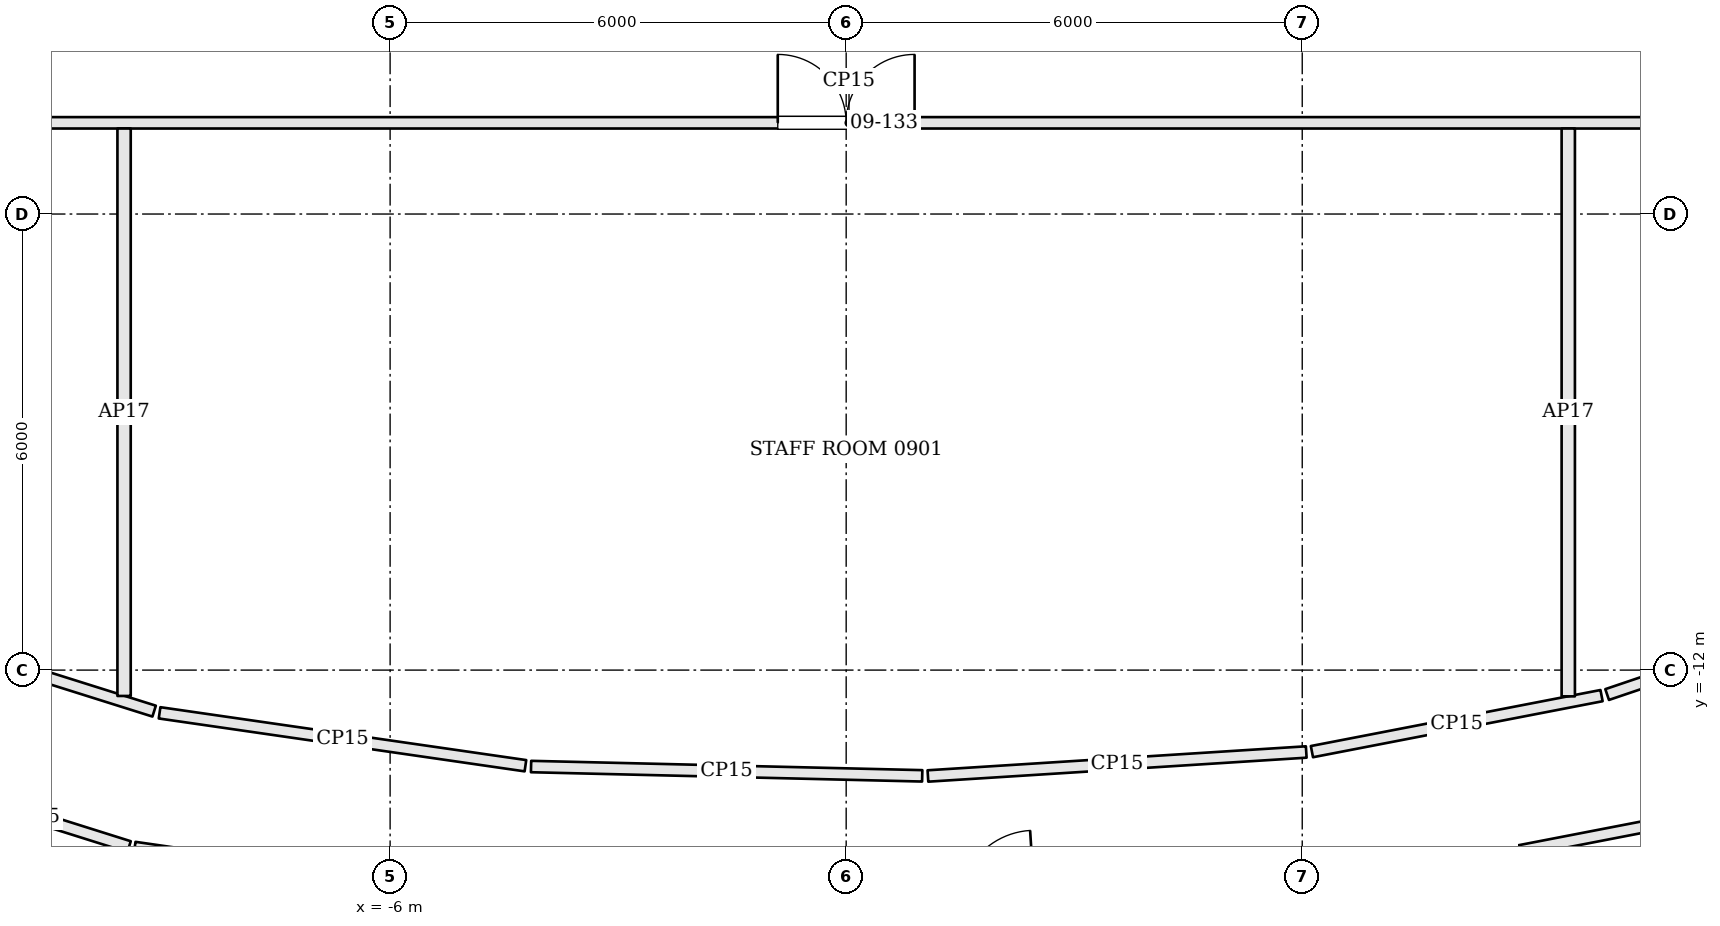
"""IFC4 building model, lengths in metres.
Left out: names, types, materials, properties, quantities, classifications, styles, units other than length and angle.
Written with IfcOpenShell. Run it as: python <this file> out.ifc"""

import sys

from ifc_helpers import new_model, si_unit, direction, frame, frame_2d, origin, place, context, subcontext, project, spatial, rectangle, extrude, element, fill, save


model = new_model("IFC4")
c1 = context("Model", 3, precision=1e-05, world=origin(), true_north=direction((0.0, 1.0)))
c2 = subcontext(c1, "Body", "Model", "MODEL_VIEW")
j1 = project(units=[si_unit("LENGTHUNIT", "METRE"), si_unit("PLANEANGLEUNIT", "RADIAN")], contexts=[c1])
p1 = place(None, origin())
s1 = spatial("IfcSite", under=j1, at=p1, CompositionType="ELEMENT")
p2 = place(p1, origin())
s2 = spatial("IfcBuilding", under=s1, at=p2, CompositionType="ELEMENT")
p3 = place(p2, frame((0.0, 0.0, 48.3)))
s3 = spatial("IfcBuildingStorey", under=s2, at=p3, CompositionType="ELEMENT", Elevation=48.3)
p4 = place(p3, frame((-11.946, -13.533, 0.0), z_axis=(0.0, 0.0, 1.0), x_axis=(0.95388072649, -0.300185875136, 0.0)))
e1 = element("IfcWall", 1, at=p4, inside=s3, PredefinedType="PARTITIONING", context=c2, shape_type="SweptSolid", body=[
    extrude(rectangle(XDim=2.633, YDim=0.15, at=frame_2d((1.316, 0.0))), origin(), (0.0, 0.0, 1.0), 2.68),
])
p5 = place(p3, frame((-9.36, -14.333, 0.0), z_axis=(0.0, 0.0, 1.0), x_axis=(0.989708543436, -0.143097865286, 0.0)))
e2 = element("IfcWall", 2, at=p5, inside=s3, PredefinedType="PARTITIONING", context=c2, shape_type="SweptSolid", body=[
    extrude(rectangle(XDim=5.117, YDim=0.15, at=frame_2d((2.558, 0.0))), origin(), (0.0, 0.0, 1.0), 2.68),
])
p6 = place(p3, frame((6.43, -14.848, 0.0), z_axis=(0.0, 0.0, 1.0), x_axis=(0.981801609996, 0.189909448446, 0.0)))
e3 = element("IfcWall", 3, at=p6, inside=s3, PredefinedType="PARTITIONING", context=c2, shape_type="SweptSolid", body=[
    extrude(rectangle(XDim=4.118, YDim=0.15, at=frame_2d((2.059, 0.0))), origin(), (0.0, 0.0, 1.0), 2.68),
])
p7 = place(p3, frame((-14.725, -4.8, 0.0), z_axis=(0.0, 0.0, 1.0), x_axis=(1.0, 0.0, 0.0)))
e4 = element("IfcWall", 4, at=p7, inside=s3, PredefinedType="PARTITIONING", context=c2, shape_type="SweptSolid", body=[
    extrude(rectangle(XDim=29.525, YDim=0.15, at=frame_2d((14.763, 0.0))), origin(), (0.0, 0.0, 1.0), 2.68),
])
p8 = place(p7, frame((2.075, 0.0, 0.0)))
e5 = element("IfcOpeningElement", 5, at=p8, cuts=e4, PredefinedType="OPENING", context=c2, shape_type="SweptSolid", body=[
    extrude(rectangle(XDim=1.0, YDim=2.4, at=frame_2d((0.5, 1.2))), frame((0.0, 0.085, 0.0), z_axis=(0.0, -1.0, 0.0), x_axis=(1.0, 0.0, 0.0)), (0.0, 0.0, 1.0), 0.17),
])
p9 = place(p7, frame((13.825, 0.0, 0.0)))
e6 = element("IfcOpeningElement", 6, at=p9, cuts=e4, PredefinedType="OPENING", context=c2, shape_type="SweptSolid", body=[
    extrude(rectangle(XDim=1.8, YDim=2.1, at=frame_2d((0.9, 1.05))), frame((0.0, 0.085, 0.0), z_axis=(0.0, -1.0, 0.0), x_axis=(1.0, 0.0, 0.0)), (0.0, 0.0, 1.0), 0.17),
])
p10 = place(p7, frame((26.375, 0.0, 0.0)))
e7 = element("IfcOpeningElement", 7, at=p10, cuts=e4, PredefinedType="OPENING", context=c2, shape_type="SweptSolid", body=[
    extrude(rectangle(XDim=1.0, YDim=2.4, at=frame_2d((0.5, 1.2))), frame((0.0, 0.085, 0.0), z_axis=(0.0, -1.0, 0.0), x_axis=(1.0, 0.0, 0.0)), (0.0, 0.0, 1.0), 0.17),
])
p11 = place(p3, frame((12.66, -11.426, 0.0), z_axis=(0.0, 0.0, 1.0), x_axis=(-0.94731220982, -0.320311687465, 0.0)))
e8 = element("IfcWall", 8, at=p11, inside=s3, PredefinedType="PARTITIONING", context=c2, shape_type="SweptSolid", body=[
    extrude(rectangle(XDim=2.796, YDim=0.15, at=frame_2d((1.398, 0.0))), origin(), (0.0, 0.0, 1.0), 2.68),
])
p12 = place(p3, frame((9.938, -12.336, 0.0), z_axis=(0.0, 0.0, 1.0), x_axis=(-0.981799909949, -0.18991823721, 0.0)))
e9 = element("IfcWall", 9, at=p12, inside=s3, PredefinedType="PARTITIONING", context=c2, shape_type="SweptSolid", body=[
    extrude(rectangle(XDim=3.881, YDim=0.15, at=frame_2d((1.94, 0.0))), origin(), (0.0, 0.0, 1.0), 2.68),
])
p13 = place(p3, frame((6.053, -13.077, 0.0), z_axis=(0.0, 0.0, 1.0), x_axis=(-0.997994823425, -0.06329559556, 0.0)))
e10 = element("IfcWall", 10, at=p13, inside=s3, PredefinedType="PARTITIONING", context=c2, shape_type="SweptSolid", body=[
    extrude(rectangle(XDim=4.987, YDim=0.15, at=frame_2d((2.494, 0.0))), origin(), (0.0, 0.0, 1.0), 2.68),
])
p14 = place(p3, frame((1.0, -13.391, 0.0), z_axis=(0.0, 0.0, 1.0), x_axis=(-0.999717667096, 0.023761020505, 0.0)))
e11 = element("IfcWall", 11, at=p14, inside=s3, PredefinedType="PARTITIONING", context=c2, shape_type="SweptSolid", body=[
    extrude(rectangle(XDim=5.148, YDim=0.15, at=frame_2d((2.574, 0.0))), origin(), (0.0, 0.0, 1.0), 2.68),
])
p15 = place(p3, frame((-4.22, -13.258, 0.0), z_axis=(0.0, 0.0, 1.0), x_axis=(-0.98971114365, 0.143079880258, 0.0)))
e12 = element("IfcWall", 12, at=p15, inside=s3, PredefinedType="PARTITIONING", context=c2, shape_type="SweptSolid", body=[
    extrude(rectangle(XDim=4.863, YDim=0.15, at=frame_2d((2.432, 0.0))), origin(), (0.0, 0.0, 1.0), 2.68),
])
p16 = place(p3, frame((-9.104, -12.54, 0.0), z_axis=(0.0, 0.0, 1.0), x_axis=(-0.953891280763, 0.300152335464, 0.0)))
e13 = element("IfcWall", 13, at=p16, inside=s3, PredefinedType="PARTITIONING", context=c2, shape_type="SweptSolid", body=[
    extrude(rectangle(XDim=3.82, YDim=0.15, at=frame_2d((1.91, 0.0))), origin(), (0.0, 0.0, 1.0), 2.68),
])
p17 = place(p3, frame((-9.5, -12.34, 0.0), z_axis=(0.0, 0.0, 1.0), x_axis=(0.0, 1.0, 0.0)))
e14 = element("IfcWall", 14, at=p17, inside=s3, PredefinedType="PARTITIONING", context=c2, shape_type="SweptSolid", body=[
    extrude(rectangle(XDim=7.465, YDim=0.175, at=frame_2d((3.733, 0.0))), origin(), (0.0, 0.0, 1.0), 2.68),
])
p18 = place(p3, frame((9.5, -12.345, 0.0), z_axis=(0.0, 0.0, 1.0), x_axis=(0.0, 1.0, 0.0)))
e15 = element("IfcWall", 15, at=p18, inside=s3, PredefinedType="PARTITIONING", context=c2, shape_type="SweptSolid", body=[
    extrude(rectangle(XDim=7.47, YDim=0.175, at=frame_2d((3.735, 0.0))), origin(), (0.0, 0.0, 1.0), 2.68),
])
p19 = place(p9, origin())
e16 = element("IfcDoor", 16, at=p19, inside=s3, OperationType="DOUBLE_DOOR_SINGLE_SWING", PredefinedType="DOOR", context=c2, shape_type="SweptSolid", body=[
    extrude(rectangle(XDim=1.8, YDim=2.1, at=frame_2d((0.9, 1.05))), frame((0.0, 0.025, 0.0), z_axis=(0.0, -1.0, 0.0), x_axis=(1.0, 0.0, 0.0)), (0.0, 0.0, 1.0), 0.05),
])
fill(e6, e16)
save(model, sys.argv[1])
